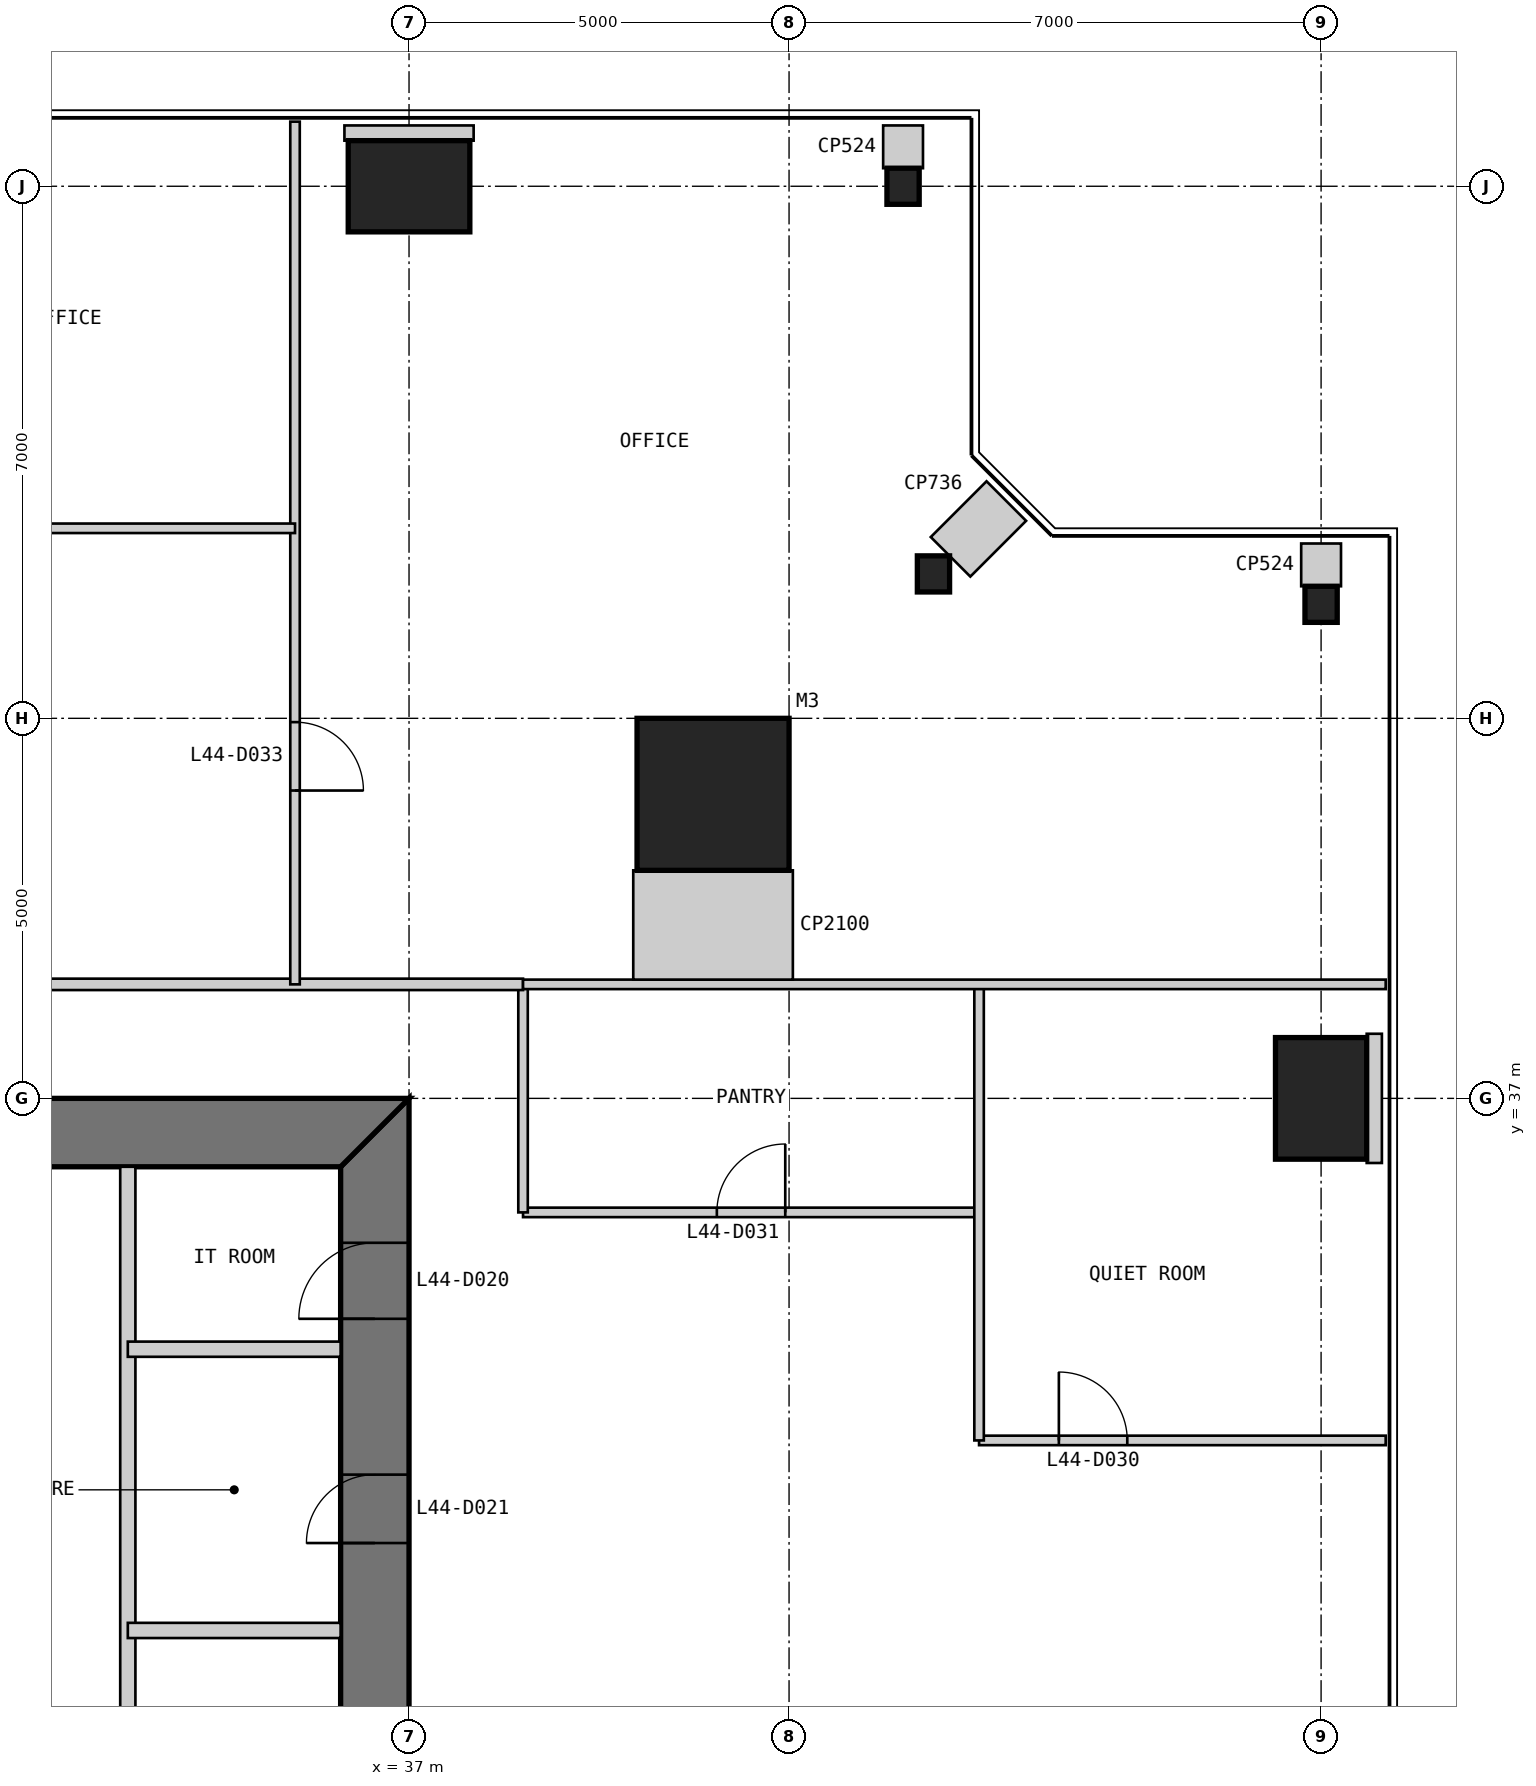
"""IFC4 building model, lengths in metres.
Left out: names, types, materials, properties, quantities, classifications, styles, units other than length and angle.
Written with IfcOpenShell. Run it as: python <this file> out.ifc"""

import sys

from ifc_helpers import new_model, si_unit, direction, frame, frame_2d, origin, origin_2d, place, context, subcontext, project, spatial, polyline, rectangle, i_section, outline, extrude, element, fill, save


model = new_model("IFC4")
c1 = context("Model", 3, precision=1e-05, world=origin(), true_north=direction((0.0, 1.0)))
c2 = subcontext(c1, "Body", "Model", "MODEL_VIEW")
j1 = project(units=[si_unit("LENGTHUNIT", "METRE"), si_unit("PLANEANGLEUNIT", "RADIAN")], contexts=[c1])
p1 = place(None, origin())
s1 = spatial("IfcSite", under=j1, at=p1, CompositionType="ELEMENT")
p2 = place(p1, origin())
s2 = spatial("IfcBuilding", under=s1, at=p2, CompositionType="ELEMENT")
p3 = place(p2, frame((0.0, 0.0, 189.8)))
s3 = spatial("IfcBuildingStorey", under=s2, at=p3, CompositionType="ELEMENT", Elevation=189.8)
p4 = place(p3, frame((41.0, 41.0, 0.0), z_axis=(0.0, 0.0, 1.0), x_axis=(1.0, 0.0, 0.0)))
e1 = element("IfcColumn", 1, at=p4, inside=s3, PredefinedType="COLUMN", context=c2, shape_type="SweptSolid", body=[
    extrude(rectangle(XDim=2.0, YDim=2.0, at=origin_2d()), origin(), (0.0, 0.0, 1.0), 4.0),
])
p5 = place(p3, frame((49.0, 37.0, 0.0), z_axis=(0.0, 0.0, 1.0), x_axis=(1.0, 0.0, 0.0)))
e2 = element("IfcColumn", 2, at=p5, inside=s3, PredefinedType="COLUMN", context=c2, shape_type="SweptSolid", body=[
    extrude(rectangle(XDim=1.2, YDim=1.6, at=origin_2d()), origin(), (0.0, 0.0, 1.0), 4.0),
])
for number, where, z_axis, x_axis in (
    (3, (49.0, 43.5, 0.0), (0.0, 0.0, 1.0), (1.0, 0.0, 0.0)),
    (4, (43.9, 43.9, 0.0), (0.0, 0.0, 1.0), (1.0, 0.0, 0.0)),
    (5, (43.5, 49.0, 0.0), (0.0, 0.0, 1.0), (1.0, 0.0, 0.0)),
):
    element("IfcColumn", number, at=place(p3, frame(where, z_axis=z_axis, x_axis=x_axis)), inside=s3, PredefinedType="COLUMN", context=c2, shape_type="SweptSolid", body=[
        extrude(i_section(OverallWidth=0.424, OverallDepth=0.475, WebThickness=0.048, FlangeThickness=0.077, at=origin_2d()), origin(), (0.0, 0.0, 1.0), 4.0),
    ])
p6 = place(p3, frame((37.0, 49.0, 0.0), z_axis=(0.0, 0.0, 1.0), x_axis=(1.0, 0.0, 0.0)))
e6 = element("IfcColumn", 6, at=p6, inside=s3, PredefinedType="COLUMN", context=c2, shape_type="SweptSolid", body=[
    extrude(rectangle(XDim=1.6, YDim=1.2, at=origin_2d()), origin(), (0.0, 0.0, 1.0), 4.0),
])
p7 = place(p3, frame((36.55, 13.9, 0.0), z_axis=(0.0, 0.0, 1.0), x_axis=(0.0, 1.0, 0.0)))
e7 = element("IfcWall", 7, at=p7, inside=s3, PredefinedType="SHEAR", context=c2, shape_type="SweptSolid", body=[
    extrude(outline(polyline([(-0.9, -0.45), (23.1, -0.45), (22.2, 0.45), (0.0, 0.45), (-0.9, -0.45)])), origin(), (0.0, 0.0, 1.0), 4.0),
])
p8 = place(p7, frame((20.2, 0.0, 0.0)))
e8 = element("IfcOpeningElement", 8, at=p8, cuts=e7, PredefinedType="OPENING", context=c2, shape_type="SweptSolid", body=[
    extrude(rectangle(XDim=1.0, YDim=2.2, at=frame_2d((0.5, 1.1))), frame((0.0, 0.46, 0.0), z_axis=(0.0, -1.0, 0.0), x_axis=(1.0, 0.0, 0.0)), (0.0, 0.0, 1.0), 0.92),
])
p9 = place(p7, frame((17.25, 0.0, 0.0)))
e9 = element("IfcOpeningElement", 9, at=p9, cuts=e7, PredefinedType="OPENING", context=c2, shape_type="SweptSolid", body=[
    extrude(rectangle(XDim=0.9, YDim=2.2, at=frame_2d((0.45, 1.1))), frame((0.0, 0.46, 0.0), z_axis=(0.0, -1.0, 0.0), x_axis=(1.0, 0.0, 0.0)), (0.0, 0.0, 1.0), 0.92),
])
p10 = place(p3, frame((37.0, 36.55, 0.0), z_axis=(0.0, 0.0, 1.0), x_axis=(-1.0, 0.0, 0.0)))
e10 = element("IfcWall", 10, at=p10, inside=s3, PredefinedType="SHEAR", context=c2, shape_type="SweptSolid", body=[
    extrude(outline(polyline([(0.0, -0.45), (24.0, -0.45), (23.1, 0.45), (0.9, 0.45), (0.0, -0.45)])), origin(), (0.0, 0.0, 1.0), 4.0),
])
p11 = place(p10, frame((4.9, 0.0, 0.0)))
e11 = element("IfcOpeningElement", 11, at=p11, cuts=e10, PredefinedType="OPENING", context=c2, shape_type="SweptSolid", body=[
    extrude(rectangle(XDim=1.0, YDim=2.2, at=frame_2d((0.5, 1.1))), frame((0.0, 0.46, 0.0), z_axis=(0.0, -1.0, 0.0), x_axis=(1.0, 0.0, 0.0)), (0.0, 0.0, 1.0), 0.92),
])
p12 = place(p10, frame((8.9, 0.0, 0.0)))
e12 = element("IfcOpeningElement", 12, at=p12, cuts=e10, PredefinedType="OPENING", context=c2, shape_type="SweptSolid", body=[
    extrude(rectangle(XDim=1.1, YDim=2.2, at=frame_2d((0.55, 1.1))), frame((0.0, 0.46, 0.0), z_axis=(0.0, -1.0, 0.0), x_axis=(1.0, 0.0, 0.0)), (0.0, 0.0, 1.0), 0.92),
])
p13 = place(p10, frame((15.05, 0.0, 0.0)))
e13 = element("IfcOpeningElement", 13, at=p13, cuts=e10, PredefinedType="OPENING", context=c2, shape_type="SweptSolid", body=[
    extrude(rectangle(XDim=0.9, YDim=2.2, at=frame_2d((0.45, 1.1))), frame((0.0, 0.46, 0.0), z_axis=(0.0, -1.0, 0.0), x_axis=(1.0, 0.0, 0.0)), (0.0, 0.0, 1.0), 0.92),
])
p14 = place(p10, frame((17.9, 0.0, 0.0)))
e14 = element("IfcOpeningElement", 14, at=p14, cuts=e10, PredefinedType="OPENING", context=c2, shape_type="SweptSolid", body=[
    extrude(rectangle(XDim=1.0, YDim=2.2, at=frame_2d((0.5, 1.1))), frame((0.0, 0.46, 0.0), z_axis=(0.0, -1.0, 0.0), x_axis=(1.0, 0.0, 0.0)), (0.0, 0.0, 1.0), 0.92),
])
p15 = place(p10, frame((21.4, 0.0, 0.0)))
e15 = element("IfcOpeningElement", 15, at=p15, cuts=e10, PredefinedType="OPENING", context=c2, shape_type="SweptSolid", body=[
    extrude(rectangle(XDim=1.0, YDim=2.2, at=frame_2d((0.5, 1.1))), frame((0.0, 0.46, 0.0), z_axis=(0.0, -1.0, 0.0), x_axis=(1.0, 0.0, 0.0)), (0.0, 0.0, 1.0), 0.92),
])
p16 = place(p3, frame((33.3, 36.1, 0.0), z_axis=(0.0, 0.0, 1.0), x_axis=(0.0, -1.0, 0.0)))
e16 = element("IfcWall", 16, at=p16, inside=s3, PredefinedType="PARTITIONING", context=c2, shape_type="SweptSolid", body=[
    extrude(rectangle(XDim=16.1, YDim=0.2, at=frame_2d((8.05, 0.0))), origin(), (0.0, 0.0, 1.0), 3.8),
])
for number, where, z_axis, x_axis in (
    (17, (36.1, 30.0, 0.0), (0.0, 0.0, 1.0), (-1.0, 0.0, 0.0)),
    (18, (36.1, 33.7, 0.0), (0.0, 0.0, 1.0), (-1.0, 0.0, 0.0)),
):
    element("IfcWall", number, at=place(p3, frame(where, z_axis=z_axis, x_axis=x_axis)), inside=s3, PredefinedType="PARTITIONING", context=c2, shape_type="SweptSolid", body=[
        extrude(rectangle(XDim=2.8, YDim=0.2, at=frame_2d((1.4, 0.0))), origin(), (0.0, 0.0, 1.0), 3.8),
    ])
p17 = place(p3, frame((49.85, 32.5, 0.0), z_axis=(0.0, 0.0, 1.0), x_axis=(-1.0, 0.0, 0.0)))
e19 = element("IfcWall", 19, at=p17, inside=s3, PredefinedType="PARTITIONING", context=c2, shape_type="SweptSolid", body=[
    extrude(rectangle(XDim=5.35, YDim=0.125, at=frame_2d((2.675, 0.0))), origin(), (0.0, 0.0, 1.0), 3.85),
])
p18 = place(p17, frame((3.4, 0.0, 0.0)))
e20 = element("IfcOpeningElement", 20, at=p18, cuts=e19, PredefinedType="OPENING", context=c2, shape_type="SweptSolid", body=[
    extrude(rectangle(XDim=0.9, YDim=2.2, at=frame_2d((0.45, 1.1))), frame((0.0, 0.073, 0.0), z_axis=(0.0, -1.0, 0.0), x_axis=(1.0, 0.0, 0.0)), (0.0, 0.0, 1.0), 0.145),
])
p19 = place(p3, frame((44.5, 35.5, 0.0), z_axis=(0.0, 0.0, 1.0), x_axis=(-1.0, 0.0, 0.0)))
e21 = element("IfcWall", 21, at=p19, inside=s3, PredefinedType="PARTITIONING", context=c2, shape_type="SweptSolid", body=[
    extrude(rectangle(XDim=6.0, YDim=0.125, at=frame_2d((3.0, 0.0))), origin(), (0.0, 0.0, 1.0), 3.85),
])
p20 = place(p19, frame((2.55, 0.0, 0.0)))
e22 = element("IfcOpeningElement", 22, at=p20, cuts=e21, PredefinedType="OPENING", context=c2, shape_type="SweptSolid", body=[
    extrude(rectangle(XDim=0.9, YDim=2.2, at=frame_2d((0.45, 1.1))), frame((0.0, 0.073, 0.0), z_axis=(0.0, -1.0, 0.0), x_axis=(1.0, 0.0, 0.0)), (0.0, 0.0, 1.0), 0.145),
])
p21 = place(p3, frame((44.5, 32.5, 0.0), z_axis=(0.0, 0.0, 1.0), x_axis=(0.0, 1.0, 0.0)))
e23 = element("IfcWall", 23, at=p21, inside=s3, PredefinedType="PARTITIONING", context=c2, shape_type="SweptSolid", body=[
    extrude(rectangle(XDim=6.0, YDim=0.125, at=frame_2d((3.0, 0.0))), origin(), (0.0, 0.0, 1.0), 3.85),
])
p22 = place(p3, frame((38.5, 35.5, 0.0), z_axis=(0.0, 0.0, 1.0), x_axis=(0.0, 1.0, 0.0)))
e24 = element("IfcWall", 24, at=p22, inside=s3, PredefinedType="PARTITIONING", context=c2, shape_type="SweptSolid", body=[
    extrude(rectangle(XDim=3.0, YDim=0.125, at=frame_2d((1.5, 0.0))), origin(), (0.0, 0.0, 1.0), 3.85),
])
p23 = place(p3, frame((38.5, 38.5, 0.0), z_axis=(0.0, 0.0, 1.0), x_axis=(-1.0, 0.0, 0.0)))
e25 = element("IfcWall", 25, at=p23, inside=s3, PredefinedType="PARTITIONING", context=c2, shape_type="SweptSolid", body=[
    extrude(rectangle(XDim=27.0, YDim=0.15, at=frame_2d((13.5, 0.0))), origin(), (0.0, 0.0, 1.0), 3.85),
])
p24 = place(p23, frame((13.0, 0.0, 0.0)))
e26 = element("IfcOpeningElement", 26, at=p24, cuts=e25, PredefinedType="OPENING", context=c2, shape_type="SweptSolid", body=[
    extrude(rectangle(XDim=1.0, YDim=2.2, at=frame_2d((0.5, 1.1))), frame((0.0, 0.085, 0.0), z_axis=(0.0, -1.0, 0.0), x_axis=(1.0, 0.0, 0.0)), (0.0, 0.0, 1.0), 0.17),
])
p25 = place(p3, frame((49.85, 38.5, 0.0), z_axis=(0.0, 0.0, 1.0), x_axis=(-1.0, 0.0, 0.0)))
e27 = element("IfcWall", 27, at=p25, inside=s3, PredefinedType="PARTITIONING", context=c2, shape_type="SweptSolid", body=[
    extrude(rectangle(XDim=11.35, YDim=0.125, at=frame_2d((5.675, 0.0))), origin(), (0.0, 0.0, 1.0), 3.85),
])
p26 = place(p3, frame((35.5, 49.85, 0.0), z_axis=(0.0, 0.0, 1.0), x_axis=(0.0, -1.0, 0.0)))
e28 = element("IfcWall", 28, at=p26, inside=s3, PredefinedType="PARTITIONING", context=c2, shape_type="SweptSolid", body=[
    extrude(rectangle(XDim=11.35, YDim=0.125, at=frame_2d((5.675, 0.0))), origin(), (0.0, 0.0, 1.0), 3.85),
])
p27 = place(p26, frame((7.9, 0.0, 0.0)))
e29 = element("IfcOpeningElement", 29, at=p27, cuts=e28, PredefinedType="OPENING", context=c2, shape_type="SweptSolid", body=[
    extrude(rectangle(XDim=0.9, YDim=2.2, at=frame_2d((0.45, 1.1))), frame((0.0, 0.073, 0.0), z_axis=(0.0, -1.0, 0.0), x_axis=(1.0, 0.0, 0.0)), (0.0, 0.0, 1.0), 0.145),
])
p28 = place(p3, frame((35.5, 44.5, 0.0), z_axis=(0.0, 0.0, 1.0), x_axis=(-1.0, 0.0, 0.0)))
e30 = element("IfcWall", 30, at=p28, inside=s3, PredefinedType="PARTITIONING", context=c2, shape_type="SweptSolid", body=[
    extrude(rectangle(XDim=24.0, YDim=0.125, at=frame_2d((12.0, 0.0))), origin(), (0.0, 0.0, 1.0), 3.85),
])
p29 = place(p28, frame((4.05, 0.0, 0.0)))
e31 = element("IfcOpeningElement", 31, at=p29, cuts=e30, PredefinedType="OPENING", context=c2, shape_type="SweptSolid", body=[
    extrude(rectangle(XDim=0.9, YDim=2.2, at=frame_2d((0.45, 1.1))), frame((0.0, 0.073, 0.0), z_axis=(0.0, -1.0, 0.0), x_axis=(1.0, 0.0, 0.0)), (0.0, 0.0, 1.0), 0.145),
])
p30 = place(p28, frame((10.05, 0.0, 0.0)))
e32 = element("IfcOpeningElement", 32, at=p30, cuts=e30, PredefinedType="OPENING", context=c2, shape_type="SweptSolid", body=[
    extrude(rectangle(XDim=0.9, YDim=2.2, at=frame_2d((0.45, 1.1))), frame((0.0, 0.073, 0.0), z_axis=(0.0, -1.0, 0.0), x_axis=(1.0, 0.0, 0.0)), (0.0, 0.0, 1.0), 0.145),
])
p31 = place(p28, frame((16.05, 0.0, 0.0)))
e33 = element("IfcOpeningElement", 33, at=p31, cuts=e30, PredefinedType="OPENING", context=c2, shape_type="SweptSolid", body=[
    extrude(rectangle(XDim=0.9, YDim=2.2, at=frame_2d((0.45, 1.1))), frame((0.0, 0.073, 0.0), z_axis=(0.0, -1.0, 0.0), x_axis=(1.0, 0.0, 0.0)), (0.0, 0.0, 1.0), 0.145),
])
p32 = place(p28, frame((19.05, 0.0, 0.0)))
e34 = element("IfcOpeningElement", 34, at=p32, cuts=e30, PredefinedType="OPENING", context=c2, shape_type="SweptSolid", body=[
    extrude(rectangle(XDim=0.9, YDim=2.2, at=frame_2d((0.45, 1.1))), frame((0.0, 0.073, 0.0), z_axis=(0.0, -1.0, 0.0), x_axis=(1.0, 0.0, 0.0)), (0.0, 0.0, 1.0), 0.145),
])
p33 = place(p3, frame((49.8, 37.0, 0.0), z_axis=(0.0, 0.0, 1.0), x_axis=(-1.0, 0.0, 0.0)))
e35 = element("IfcWall", 35, at=p33, inside=s3, PredefinedType="PARTITIONING", context=c2, shape_type="SweptSolid", body=[
    extrude(rectangle(XDim=0.2, YDim=1.7, at=frame_2d((0.1, 0.0))), origin(), (0.0, 0.0, 1.0), 3.85),
])
p34 = place(p3, frame((41.0, 38.562, 0.0), z_axis=(0.0, 0.0, 1.0), x_axis=(0.0, 1.0, 0.0)))
e36 = element("IfcWall", 36, at=p34, inside=s3, PredefinedType="PARTITIONING", context=c2, shape_type="SweptSolid", body=[
    extrude(rectangle(XDim=1.438, YDim=2.1, at=frame_2d((0.719, 0.0))), origin(), (0.0, 0.0, 1.0), 3.85),
])
p35 = place(p3, frame((49.0, 44.3, 0.0), z_axis=(0.0, 0.0, 1.0), x_axis=(0.0, -1.0, 0.0)))
e37 = element("IfcWall", 37, at=p35, inside=s3, PredefinedType="PARTITIONING", context=c2, shape_type="SweptSolid", body=[
    extrude(rectangle(XDim=0.562, YDim=0.524, at=frame_2d((0.281, 0.0))), origin(), (0.0, 0.0, 1.0), 3.85),
])
p36 = place(p3, frame((44.859, 44.859, 0.0), z_axis=(0.0, 0.0, 1.0), x_axis=(-0.707106781187, -0.707106781187, 0.0)))
e38 = element("IfcWall", 38, at=p36, inside=s3, PredefinedType="PARTITIONING", context=c2, shape_type="SweptSolid", body=[
    extrude(rectangle(XDim=1.038, YDim=0.736, at=frame_2d((0.519, 0.0))), origin(), (0.0, 0.0, 1.0), 3.85),
])
p37 = place(p3, frame((43.5, 49.8, 0.0), z_axis=(0.0, 0.0, 1.0), x_axis=(0.0, -1.0, 0.0)))
e39 = element("IfcWall", 39, at=p37, inside=s3, PredefinedType="PARTITIONING", context=c2, shape_type="SweptSolid", body=[
    extrude(rectangle(XDim=0.562, YDim=0.524, at=frame_2d((0.281, 0.0))), origin(), (0.0, 0.0, 1.0), 3.85),
])
p38 = place(p3, frame((37.0, 49.8, 0.0), z_axis=(0.0, 0.0, 1.0), x_axis=(0.0, -1.0, 0.0)))
e40 = element("IfcWall", 40, at=p38, inside=s3, PredefinedType="PARTITIONING", context=c2, shape_type="SweptSolid", body=[
    extrude(rectangle(XDim=0.2, YDim=1.7, at=frame_2d((0.1, 0.0))), origin(), (0.0, 0.0, 1.0), 3.85),
])
p39 = place(p8, origin())
e41 = element("IfcDoor", 41, at=p39, inside=s3, OperationType="SINGLE_SWING_LEFT", PredefinedType="DOOR", context=c2, shape_type="SweptSolid", body=[
    extrude(rectangle(XDim=1.0, YDim=2.2, at=frame_2d((0.5, 1.1))), frame((0.0, 0.025, 0.0), z_axis=(0.0, -1.0, 0.0), x_axis=(1.0, 0.0, 0.0)), (0.0, 0.0, 1.0), 0.05),
    extrude(outline(polyline([(0.0, 0.0), (0.04, 0.0), (0.04, 2.16), (0.96, 2.16), (0.96, 0.0), (1.0, 0.0), (1.0, 2.2), (0.0, 2.2), (0.0, 0.0)])), frame((0.0, 0.3, 0.0), z_axis=(0.0, -1.0, 0.0), x_axis=(1.0, 0.0, 0.0)), (0.0, 0.0, 1.0), 0.6),
])
fill(e8, e41)
p40 = place(p9, origin())
e42 = element("IfcDoor", 42, at=p40, inside=s3, OperationType="SINGLE_SWING_LEFT", PredefinedType="DOOR", context=c2, shape_type="SweptSolid", body=[
    extrude(rectangle(XDim=0.9, YDim=2.2, at=frame_2d((0.45, 1.1))), frame((0.0, 0.025, 0.0), z_axis=(0.0, -1.0, 0.0), x_axis=(1.0, 0.0, 0.0)), (0.0, 0.0, 1.0), 0.05),
    extrude(outline(polyline([(0.0, 0.0), (0.04, 0.0), (0.04, 2.16), (0.86, 2.16), (0.86, 0.0), (0.9, 0.0), (0.9, 2.2), (0.0, 2.2), (0.0, 0.0)])), frame((0.0, 0.3, 0.0), z_axis=(0.0, -1.0, 0.0), x_axis=(1.0, 0.0, 0.0)), (0.0, 0.0, 1.0), 0.6),
])
fill(e9, e42)
p41 = place(p18, frame((0.9, 0.0, 0.0), z_axis=(0.0, 0.0, 1.0), x_axis=(-1.0, 0.0, 0.0)))
e43 = element("IfcDoor", 43, at=p41, inside=s3, OperationType="SINGLE_SWING_LEFT", PredefinedType="DOOR", context=c2, shape_type="SweptSolid", body=[
    extrude(rectangle(XDim=0.9, YDim=2.2, at=frame_2d((0.45, 1.1))), frame((0.0, 0.025, 0.0), z_axis=(0.0, -1.0, 0.0), x_axis=(1.0, 0.0, 0.0)), (0.0, 0.0, 1.0), 0.05),
])
fill(e20, e43)
p42 = place(p20, frame((0.9, 0.0, 0.0), z_axis=(0.0, 0.0, 1.0), x_axis=(-1.0, 0.0, 0.0)))
e44 = element("IfcDoor", 44, at=p42, inside=s3, OperationType="SINGLE_SWING_RIGHT", PredefinedType="DOOR", context=c2, shape_type="SweptSolid", body=[
    extrude(rectangle(XDim=0.9, YDim=2.2, at=frame_2d((0.45, 1.1))), frame((0.0, 0.025, 0.0), z_axis=(0.0, -1.0, 0.0), x_axis=(1.0, 0.0, 0.0)), (0.0, 0.0, 1.0), 0.05),
])
fill(e22, e44)
p43 = place(p27, origin())
e45 = element("IfcDoor", 45, at=p43, inside=s3, OperationType="SINGLE_SWING_RIGHT", PredefinedType="DOOR", context=c2, shape_type="SweptSolid", body=[
    extrude(rectangle(XDim=0.9, YDim=2.2, at=frame_2d((0.45, 1.1))), frame((0.0, 0.025, 0.0), z_axis=(0.0, -1.0, 0.0), x_axis=(1.0, 0.0, 0.0)), (0.0, 0.0, 1.0), 0.05),
])
fill(e29, e45)
save(model, sys.argv[1])
